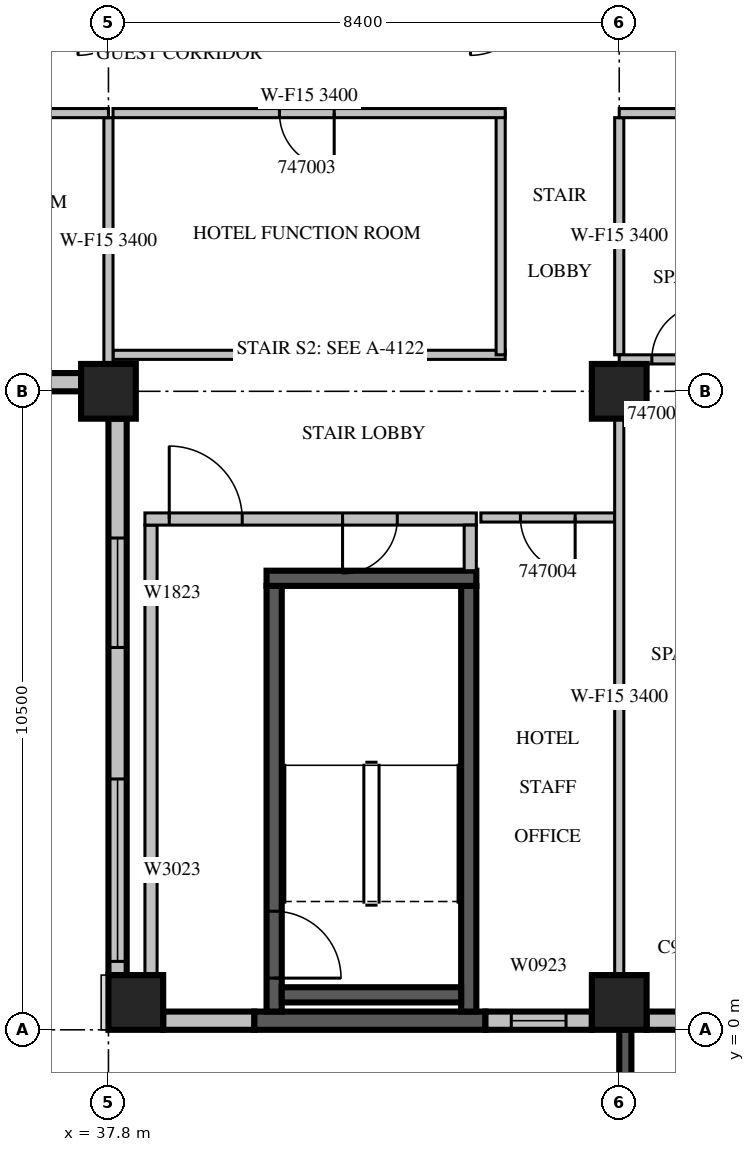
"""IFC4 building model, lengths in metres.
Left out: names, types, materials, properties, quantities, classifications, styles, units other than length and angle.
Written with IfcOpenShell. Run it as: python <this file> out.ifc"""

import sys

from ifc_helpers import new_model, si_unit, direction, frame, frame_2d, origin, origin_2d, place, context, subcontext, project, spatial, rectangle, extrude, source, transform, mapped, element, fill, save


model = new_model("IFC4")
c1 = context("Model", 3, precision=1e-05, world=origin(), true_north=direction((0.0, 1.0)))
c2 = subcontext(c1, "Body", "Model", "MODEL_VIEW")
j1 = project(units=[si_unit("LENGTHUNIT", "METRE"), si_unit("PLANEANGLEUNIT", "RADIAN")], contexts=[c1])
p1 = place(None, origin())
s1 = spatial("IfcSite", under=j1, at=p1, CompositionType="ELEMENT")
p2 = place(p1, origin())
s2 = spatial("IfcBuilding", under=s1, at=p2, CompositionType="ELEMENT")
p3 = place(p2, frame((0.0, 0.0, 212.0)))
s3 = spatial("IfcBuildingStorey", under=s2, at=p3, CompositionType="ELEMENT", Elevation=212.0)
m1 = source(origin(), c2, "Body", "SweptSolid", [
    extrude(rectangle(XDim=0.9, YDim=0.9, at=origin_2d()), origin(), (0.0, 0.0, 1.0), 3.8),
])
for number, where, z_axis, x_axis in (
    (1, (38.25, 0.45, 0.0), (0.0, 0.0, 1.0), (1.0, 0.0, 0.0)),
    (2, (46.2, 0.45, 0.0), (0.0, 0.0, 1.0), (1.0, 0.0, 0.0)),
    (3, (37.8, 10.5, 0.0), (0.0, 0.0, 1.0), (1.0, 0.0, 0.0)),
    (4, (46.2, 10.5, 0.0), (0.0, 0.0, 1.0), (1.0, 0.0, 0.0)),
):
    element("IfcColumn", number, at=place(p3, frame(where, z_axis=z_axis, x_axis=x_axis)), inside=s3, PredefinedType="COLUMN", context=c2, shape_type="MappedRepresentation", body=[
        mapped(m1, transform((0.0, 0.0, 0.0), scale=1.0)),
    ])
m2 = source(origin(), c2, "Body", "SweptSolid", [
    extrude(rectangle(XDim=7.5, YDim=0.3, at=frame_2d((3.75, 0.0))), origin(), (0.0, 0.0, 1.0), 2.4),
])
p4 = place(p3, frame((29.85, 10.65, 0.0), z_axis=(0.0, 0.0, 1.0), x_axis=(1.0, 0.0, 0.0)))
e5 = element("IfcWall", 5, at=p4, inside=s3, PredefinedType="STANDARD", context=c2, shape_type="MappedRepresentation", body=[
    mapped(m2, transform((0.0, 0.0, 0.0), scale=1.0)),
])
m3 = source(origin(), c2, "Body", "SweptSolid", [
    extrude(rectangle(XDim=9.15, YDim=0.3, at=frame_2d((4.575, 0.0))), origin(), (0.0, 0.0, 1.0), 3.4),
])
p5 = place(p3, frame((37.95, 10.05, 0.0), z_axis=(0.0, 0.0, 1.0), x_axis=(0.0, -1.0, 0.0)))
e6 = element("IfcWall", 6, at=p5, inside=s3, PredefinedType="STANDARD", context=c2, shape_type="MappedRepresentation", body=[
    mapped(m3, transform((0.0, 0.0, 0.0), scale=1.0)),
])
m4 = source(origin(), c2, "Body", "SweptSolid", [
    extrude(rectangle(XDim=1.8, YDim=2.3, at=frame_2d((0.9, 1.15))), frame((0.0, 0.16, 0.0), z_axis=(0.0, -1.0, 0.0), x_axis=(1.0, 0.0, 0.0)), (0.0, 0.0, 1.0), 0.32),
])
p6 = place(p5, frame((1.962, 0.0, 0.6)))
e7 = element("IfcOpeningElement", 7, at=p6, cuts=e6, PredefinedType="OPENING", context=c2, shape_type="MappedRepresentation", body=[
    mapped(m4, transform((0.0, 0.0, 0.0), scale=1.0)),
])
m5 = source(origin(), c2, "Body", "SweptSolid", [
    extrude(rectangle(XDim=3.0, YDim=2.3, at=frame_2d((1.5, 1.15))), frame((0.0, 0.16, 0.0), z_axis=(0.0, -1.0, 0.0), x_axis=(1.0, 0.0, 0.0)), (0.0, 0.0, 1.0), 0.32),
])
p7 = place(p5, frame((5.925, 0.0, 0.6)))
e8 = element("IfcOpeningElement", 8, at=p7, cuts=e6, PredefinedType="OPENING", context=c2, shape_type="MappedRepresentation", body=[
    mapped(m5, transform((0.0, 0.0, 0.0), scale=1.0)),
])
m6 = source(origin(), c2, "Body", "SweptSolid", [
    extrude(rectangle(XDim=1.5, YDim=0.3, at=frame_2d((0.75, 0.0))), origin(), (0.0, 0.0, 1.0), 3.4),
])
p8 = place(p3, frame((38.7, 0.15, 0.0), z_axis=(0.0, 0.0, 1.0), x_axis=(1.0, 0.0, 0.0)))
e9 = element("IfcWall", 9, at=p8, inside=s3, PredefinedType="STANDARD", context=c2, shape_type="MappedRepresentation", body=[
    mapped(m6, transform((0.0, 0.0, 0.0), scale=1.0)),
])
m7 = source(origin(), c2, "Body", "SweptSolid", [
    extrude(rectangle(XDim=3.8, YDim=0.3, at=frame_2d((1.9, 0.0))), origin(), (0.0, 0.0, 1.0), 3.4),
])
p9 = place(p3, frame((40.2, 0.15, 0.0), z_axis=(0.0, 0.0, 1.0), x_axis=(1.0, 0.0, 0.0)))
e10 = element("IfcWall", 10, at=p9, inside=s3, PredefinedType="SOLIDWALL", context=c2, shape_type="MappedRepresentation", body=[
    mapped(m7, transform((0.0, 0.0, 0.0), scale=1.0)),
])
m8 = source(origin(), c2, "Body", "SweptSolid", [
    extrude(rectangle(XDim=1.75, YDim=0.3, at=frame_2d((0.875, 0.0))), origin(), (0.0, 0.0, 1.0), 3.4),
])
p10 = place(p3, frame((44.0, 0.15, 0.0), z_axis=(0.0, 0.0, 1.0), x_axis=(1.0, 0.0, 0.0)))
e11 = element("IfcWall", 11, at=p10, inside=s3, PredefinedType="STANDARD", context=c2, shape_type="MappedRepresentation", body=[
    mapped(m8, transform((0.0, 0.0, 0.0), scale=1.0)),
])
m9 = source(origin(), c2, "Body", "SweptSolid", [
    extrude(rectangle(XDim=0.9, YDim=2.3, at=frame_2d((0.45, 1.15))), frame((0.0, 0.16, 0.0), z_axis=(0.0, -1.0, 0.0), x_axis=(1.0, 0.0, 0.0)), (0.0, 0.0, 1.0), 0.32),
])
p11 = place(p10, frame((0.425, 0.0, 0.6)))
e12 = element("IfcOpeningElement", 12, at=p11, cuts=e11, PredefinedType="OPENING", context=c2, shape_type="MappedRepresentation", body=[
    mapped(m9, transform((0.0, 0.0, 0.0), scale=1.0)),
])
m10 = source(origin(), c2, "Body", "SweptSolid", [
    extrude(rectangle(XDim=4.98, YDim=0.3, at=frame_2d((2.49, 0.0))), origin(), (0.0, 0.0, 1.0), 3.4),
])
p12 = place(p3, frame((46.65, 0.15, 0.0), z_axis=(0.0, 0.0, 1.0), x_axis=(1.0, 0.0, 0.0)))
e13 = element("IfcWall", 13, at=p12, inside=s3, PredefinedType="STANDARD", context=c2, shape_type="MappedRepresentation", body=[
    mapped(m10, transform((0.0, 0.0, 0.0), scale=1.0)),
])
m11 = source(origin(), c2, "Body", "SweptSolid", [
    extrude(rectangle(XDim=1.0, YDim=2.1, at=frame_2d((0.5, 1.05))), frame((0.0, 0.16, 0.0), z_axis=(0.0, -1.0, 0.0), x_axis=(1.0, 0.0, 0.0)), (0.0, 0.0, 1.0), 0.32),
])
p13 = place(p12, frame((1.99, 0.0, 0.0)))
e14 = element("IfcOpeningElement", 14, at=p13, cuts=e13, PredefinedType="OPENING", context=c2, shape_type="MappedRepresentation", body=[
    mapped(m11, transform((0.0, 0.0, 0.0), scale=1.0)),
])
m12 = source(origin(), c2, "Body", "SweptSolid", [
    extrude(rectangle(XDim=3.9, YDim=0.2, at=frame_2d((1.95, 0.0))), origin(), (0.0, 0.0, 1.0), 3.39),
])
p14 = place(p3, frame((46.3, 0.0, 0.0), z_axis=(0.0, 0.0, 1.0), x_axis=(0.0, -1.0, 0.0)))
e15 = element("IfcWall", 15, at=p14, inside=s3, PredefinedType="SOLIDWALL", context=c2, shape_type="MappedRepresentation", body=[
    mapped(m12, transform((0.0, 0.0, 0.0), scale=1.0)),
])
m13 = source(origin(), c2, "Body", "SweptSolid", [
    extrude(rectangle(XDim=2.4, YDim=2.3, at=frame_2d((1.2, 1.15))), frame((0.0, 0.11, 0.0), z_axis=(0.0, -1.0, 0.0), x_axis=(1.0, 0.0, 0.0)), (0.0, 0.0, 1.0), 0.22),
])
p15 = place(p14, frame((0.75, 0.0, 0.6)))
e16 = element("IfcOpeningElement", 16, at=p15, cuts=e15, PredefinedType="OPENING", context=c2, shape_type="MappedRepresentation", body=[
    mapped(m13, transform((0.0, 0.0, 0.0), scale=1.0)),
])
m14 = source(origin(), c2, "Body", "SweptSolid", [
    extrude(rectangle(XDim=7.0, YDim=0.25, at=frame_2d((3.5, 0.0))), origin(), (0.0, 0.0, 1.0), 3.4),
])
p16 = place(p3, frame((40.525, 0.3, 0.0), z_axis=(0.0, 0.0, 1.0), x_axis=(0.0, 1.0, 0.0)))
e17 = element("IfcWall", 17, at=p16, inside=s3, PredefinedType="SOLIDWALL", context=c2, shape_type="MappedRepresentation", body=[
    mapped(m14, transform((0.0, 0.0, 0.0), scale=1.0)),
])
m15 = source(origin(), c2, "Body", "SweptSolid", [
    extrude(rectangle(XDim=1.1, YDim=2.1, at=frame_2d((0.55, 1.05))), frame((0.0, 0.135, 0.0), z_axis=(0.0, -1.0, 0.0), x_axis=(1.0, 0.0, 0.0)), (0.0, 0.0, 1.0), 0.27),
])
p17 = place(p16, frame((0.55, 0.0, 0.0)))
e18 = element("IfcOpeningElement", 18, at=p17, cuts=e17, PredefinedType="OPENING", context=c2, shape_type="MappedRepresentation", body=[
    mapped(m15, transform((0.0, 0.0, 0.0), scale=1.0)),
])
p18 = place(p3, frame((43.725, 0.3, 0.0), z_axis=(0.0, 0.0, 1.0), x_axis=(0.0, 1.0, 0.0)))
e19 = element("IfcWall", 19, at=p18, inside=s3, PredefinedType="SOLIDWALL", context=c2, shape_type="MappedRepresentation", body=[
    mapped(m14, transform((0.0, 0.0, 0.0), scale=1.0)),
])
m16 = source(origin(), c2, "Body", "SweptSolid", [
    extrude(rectangle(XDim=3.45, YDim=0.25, at=frame_2d((1.725, 0.0))), origin(), (0.0, 0.0, 1.0), 3.4),
])
p19 = place(p3, frame((40.4, 7.425, 0.0), z_axis=(0.0, 0.0, 1.0), x_axis=(1.0, 0.0, 0.0)))
e20 = element("IfcWall", 20, at=p19, inside=s3, PredefinedType="SOLIDWALL", context=c2, shape_type="MappedRepresentation", body=[
    mapped(m16, transform((0.0, 0.0, 0.0), scale=1.0)),
])
m17 = source(origin(), c2, "Body", "SweptSolid", [
    extrude(rectangle(XDim=2.95, YDim=0.25, at=frame_2d((1.475, 0.0))), origin(), (0.0, 0.0, 1.0), 3.4),
])
p20 = place(p3, frame((40.65, 0.575, 0.0), z_axis=(0.0, 0.0, 1.0), x_axis=(1.0, 0.0, 0.0)))
e21 = element("IfcWall", 21, at=p20, inside=s3, PredefinedType="SOLIDWALL", context=c2, shape_type="MappedRepresentation", body=[
    mapped(m17, transform((0.0, 0.0, 0.0), scale=1.0)),
])
m18 = source(origin(), c2, "Body", "SweptSolid", [
    extrude(rectangle(XDim=8.0, YDim=0.2, at=frame_2d((4.0, 0.0))), origin(), (0.0, 0.0, 1.0), 3.4),
])
p21 = place(p3, frame((38.5, 0.3, 0.0), z_axis=(0.0, 0.0, 1.0), x_axis=(0.0, 1.0, 0.0)))
e22 = element("IfcWall", 22, at=p21, inside=s3, PredefinedType="PARTITIONING", context=c2, shape_type="MappedRepresentation", body=[
    mapped(m18, transform((0.0, 0.0, 0.0), scale=1.0)),
])
m19 = source(origin(), c2, "Body", "SweptSolid", [
    extrude(rectangle(XDim=5.45, YDim=0.2, at=frame_2d((2.725, 0.0))), origin(), (0.0, 0.0, 1.0), 3.4),
])
p22 = place(p3, frame((38.4, 8.4, 0.0), z_axis=(0.0, 0.0, 1.0), x_axis=(1.0, 0.0, 0.0)))
e23 = element("IfcWall", 23, at=p22, inside=s3, PredefinedType="PARTITIONING", context=c2, shape_type="MappedRepresentation", body=[
    mapped(m19, transform((0.0, 0.0, 0.0), scale=1.0)),
])
m20 = source(origin(), c2, "Body", "SweptSolid", [
    extrude(rectangle(XDim=1.2, YDim=2.1, at=frame_2d((0.6, 1.05))), frame((0.0, 0.11, 0.0), z_axis=(0.0, -1.0, 0.0), x_axis=(1.0, 0.0, 0.0)), (0.0, 0.0, 1.0), 0.22),
])
p23 = place(p22, frame((0.4, 0.0, 0.0)))
e24 = element("IfcOpeningElement", 24, at=p23, cuts=e23, PredefinedType="OPENING", context=c2, shape_type="MappedRepresentation", body=[
    mapped(m20, transform((0.0, 0.0, 0.0), scale=1.0)),
])
m21 = source(origin(), c2, "Body", "SweptSolid", [
    extrude(rectangle(XDim=0.9, YDim=2.1, at=frame_2d((0.45, 1.05))), frame((0.0, 0.11, 0.0), z_axis=(0.0, -1.0, 0.0), x_axis=(1.0, 0.0, 0.0)), (0.0, 0.0, 1.0), 0.22),
])
p24 = place(p22, frame((3.25, 0.0, 0.0)))
e25 = element("IfcOpeningElement", 25, at=p24, cuts=e23, PredefinedType="OPENING", context=c2, shape_type="MappedRepresentation", body=[
    mapped(m21, transform((0.0, 0.0, 0.0), scale=1.0)),
])
m22 = source(origin(), c2, "Body", "SweptSolid", [
    extrude(rectangle(XDim=0.75, YDim=0.2, at=frame_2d((0.375, 0.0))), origin(), (0.0, 0.0, 1.0), 3.4),
])
p25 = place(p3, frame((43.75, 7.55, 0.0), z_axis=(0.0, 0.0, 1.0), x_axis=(0.0, 1.0, 0.0)))
e26 = element("IfcWall", 26, at=p25, inside=s3, PredefinedType="PARTITIONING", context=c2, shape_type="MappedRepresentation", body=[
    mapped(m22, transform((0.0, 0.0, 0.0), scale=1.0)),
])
m23 = source(origin(), c2, "Body", "SweptSolid", [
    extrude(rectangle(XDim=6.45, YDim=0.15, at=frame_2d((3.225, 0.0))), origin(), (0.0, 0.0, 1.0), 3.4),
])
p26 = place(p3, frame((37.875, 11.1, 0.0), z_axis=(0.0, 0.0, 1.0), x_axis=(1.0, 0.0, 0.0)))
e27 = element("IfcWall", 27, at=p26, inside=s3, PredefinedType="PARTITIONING", context=c2, shape_type="MappedRepresentation", body=[
    mapped(m23, transform((0.0, 0.0, 0.0), scale=1.0)),
])
m24 = source(origin(), c2, "Body", "SweptSolid", [
    extrude(rectangle(XDim=3.975, YDim=0.15, at=frame_2d((1.988, 0.0))), origin(), (0.0, 0.0, 1.0), 3.4),
])
p27 = place(p3, frame((44.25, 11.1, 0.0), z_axis=(0.0, 0.0, 1.0), x_axis=(0.0, 1.0, 0.0)))
e28 = element("IfcWall", 28, at=p27, inside=s3, PredefinedType="PARTITIONING", context=c2, shape_type="MappedRepresentation", body=[
    mapped(m24, transform((0.0, 0.0, 0.0), scale=1.0)),
])
p28 = place(p3, frame((44.325, 15.075, 0.0), z_axis=(0.0, 0.0, 1.0), x_axis=(-1.0, 0.0, 0.0)))
e29 = element("IfcWall", 29, at=p28, inside=s3, PredefinedType="PARTITIONING", context=c2, shape_type="MappedRepresentation", body=[
    mapped(m23, transform((0.0, 0.0, 0.0), scale=1.0)),
])
m25 = source(origin(), c2, "Body", "SweptSolid", [
    extrude(rectangle(XDim=0.9, YDim=2.1, at=frame_2d((0.45, 1.05))), frame((0.0, 0.085, 0.0), z_axis=(0.0, -1.0, 0.0), x_axis=(1.0, 0.0, 0.0)), (0.0, 0.0, 1.0), 0.17),
])
p29 = place(p28, frame((2.812, 0.0, 0.0)))
e30 = element("IfcOpeningElement", 30, at=p29, cuts=e29, PredefinedType="OPENING", context=c2, shape_type="MappedRepresentation", body=[
    mapped(m25, transform((0.0, 0.0, 0.0), scale=1.0)),
])
m26 = source(origin(), c2, "Body", "SweptSolid", [
    extrude(rectangle(XDim=2.2, YDim=0.15, at=frame_2d((1.1, 0.0))), origin(), (0.0, 0.0, 1.0), 3.4),
])
p30 = place(p3, frame((46.125, 8.425, 0.0), z_axis=(0.0, 0.0, 1.0), x_axis=(-1.0, 0.0, 0.0)))
e31 = element("IfcWall", 31, at=p30, inside=s3, PredefinedType="PARTITIONING", context=c2, shape_type="MappedRepresentation", body=[
    mapped(m26, transform((0.0, 0.0, 0.0), scale=1.0)),
])
p31 = place(p30, frame((0.65, 0.0, 0.0)))
e32 = element("IfcOpeningElement", 32, at=p31, cuts=e31, PredefinedType="OPENING", context=c2, shape_type="MappedRepresentation", body=[
    mapped(m25, transform((0.0, 0.0, 0.0), scale=1.0)),
])
m27 = source(origin(), c2, "Body", "SweptSolid", [
    extrude(rectangle(XDim=4.051, YDim=0.15, at=frame_2d((2.026, 0.0))), origin(), (0.0, 0.0, 1.0), 3.4),
])
p32 = place(p3, frame((37.8, 10.949, 0.0), z_axis=(0.0, 0.0, 1.0), x_axis=(0.0, 1.0, 0.0)))
e33 = element("IfcWall", 33, at=p32, inside=s3, PredefinedType="PARTITIONING", context=c2, shape_type="MappedRepresentation", body=[
    mapped(m27, transform((0.0, 0.0, 0.0), scale=1.0)),
])
m28 = source(origin(), c2, "Body", "SweptSolid", [
    extrude(rectangle(XDim=9.152, YDim=0.15, at=frame_2d((4.576, 0.0))), origin(), (0.0, 0.0, 1.0), 3.4),
])
p33 = place(p3, frame((46.2, 0.899, 0.0), z_axis=(0.0, 0.0, 1.0), x_axis=(0.0, 1.0, 0.0)))
e34 = element("IfcWall", 34, at=p33, inside=s3, PredefinedType="PARTITIONING", context=c2, shape_type="MappedRepresentation", body=[
    mapped(m28, transform((0.0, 0.0, 0.0), scale=1.0)),
])
m29 = source(origin(), c2, "Body", "SweptSolid", [
    extrude(rectangle(XDim=3.9, YDim=0.15, at=frame_2d((1.95, 0.0))), origin(), (0.0, 0.0, 1.0), 3.4),
])
p34 = place(p3, frame((46.2, 11.1, 0.0), z_axis=(0.0, 0.0, 1.0), x_axis=(0.0, 1.0, 0.0)))
e35 = element("IfcWall", 35, at=p34, inside=s3, PredefinedType="PARTITIONING", context=c2, shape_type="MappedRepresentation", body=[
    mapped(m29, transform((0.0, 0.0, 0.0), scale=1.0)),
])
m30 = source(origin(), c2, "Body", "SweptSolid", [
    extrude(rectangle(XDim=7.355, YDim=0.15, at=frame_2d((3.678, 0.0))), origin(), (0.0, 0.0, 1.0), 3.4),
])
p35 = place(p3, frame((53.555, 11.025, 0.0), z_axis=(0.0, 0.0, 1.0), x_axis=(-1.0, 0.0, 0.0)))
e36 = element("IfcWall", 36, at=p35, inside=s3, PredefinedType="PARTITIONING", context=c2, shape_type="MappedRepresentation", body=[
    mapped(m30, transform((0.0, 0.0, 0.0), scale=1.0)),
])
m31 = source(origin(), c2, "Body", "SweptSolid", [
    extrude(rectangle(XDim=1.0, YDim=2.1, at=frame_2d((0.5, 1.05))), frame((0.0, 0.085, 0.0), z_axis=(0.0, -1.0, 0.0), x_axis=(1.0, 0.0, 0.0)), (0.0, 0.0, 1.0), 0.17),
])
p36 = place(p35, frame((4.869, 0.0, 0.0)))
e37 = element("IfcOpeningElement", 37, at=p36, cuts=e36, PredefinedType="OPENING", context=c2, shape_type="MappedRepresentation", body=[
    mapped(m31, transform((0.0, 0.0, 0.0), scale=1.0)),
])
p37 = place(p35, frame((5.919, 0.0, 0.0)))
e38 = element("IfcOpeningElement", 38, at=p37, cuts=e36, PredefinedType="OPENING", context=c2, shape_type="MappedRepresentation", body=[
    mapped(m25, transform((0.0, 0.0, 0.0), scale=1.0)),
])
m32 = source(origin(), c2, "Body", "SweptSolid", [
    extrude(rectangle(XDim=8.4, YDim=0.15, at=frame_2d((4.2, 0.0))), origin(), (0.0, 0.0, 1.0), 2.9),
])
p38 = place(p3, frame((37.8, 15.075, 0.0), z_axis=(0.0, 0.0, 1.0), x_axis=(-1.0, 0.0, 0.0)))
e39 = element("IfcWall", 39, at=p38, inside=s3, PredefinedType="PARTITIONING", context=c2, shape_type="MappedRepresentation", body=[
    mapped(m32, transform((0.0, 0.0, 0.0), scale=1.0)),
])
p39 = place(p38, frame((7.155, 0.0, 0.0)))
e40 = element("IfcOpeningElement", 40, at=p39, cuts=e39, PredefinedType="OPENING", context=c2, shape_type="MappedRepresentation", body=[
    mapped(m31, transform((0.0, 0.0, 0.0), scale=1.0)),
])
p40 = place(p38, frame((1.767, 0.0, 0.0)))
e41 = element("IfcOpeningElement", 41, at=p40, cuts=e39, PredefinedType="OPENING", context=c2, shape_type="MappedRepresentation", body=[
    mapped(m25, transform((0.0, 0.0, 0.0), scale=1.0)),
])
p41 = place(p3, frame((53.555, 15.075, 0.0), z_axis=(0.0, 0.0, 1.0), x_axis=(-1.0, 0.0, 0.0)))
e42 = element("IfcWall", 42, at=p41, inside=s3, PredefinedType="PARTITIONING", context=c2, shape_type="MappedRepresentation", body=[
    mapped(m30, transform((0.0, 0.0, 0.0), scale=1.0)),
])
m33 = source(origin(), c2, "Body", "SweptSolid", [
    extrude(rectangle(XDim=1.2, YDim=2.1, at=frame_2d((0.6, 1.05))), frame((0.0, 0.085, 0.0), z_axis=(0.0, -1.0, 0.0), x_axis=(1.0, 0.0, 0.0)), (0.0, 0.0, 1.0), 0.17),
])
p42 = place(p41, frame((5.006, 0.0, 0.0)))
e43 = element("IfcOpeningElement", 43, at=p42, cuts=e42, PredefinedType="OPENING", context=c2, shape_type="MappedRepresentation", body=[
    mapped(m33, transform((0.0, 0.0, 0.0), scale=1.0)),
])
p43 = place(p41, frame((2.124, 0.0, 0.0)))
e44 = element("IfcOpeningElement", 44, at=p43, cuts=e42, PredefinedType="OPENING", context=c2, shape_type="MappedRepresentation", body=[
    mapped(m25, transform((0.0, 0.0, 0.0), scale=1.0)),
])
m34 = source(origin(), c2, "Body", "SweptSolid", [
    extrude(rectangle(XDim=1.8, YDim=2.3, at=frame_2d((0.9, 1.15))), frame((0.0, 0.03, 0.0), z_axis=(0.0, -1.0, 0.0), x_axis=(1.0, 0.0, 0.0)), (0.0, 0.0, 1.0), 0.06),
])
p44 = place(p6, origin())
e45 = element("IfcWindow", 45, at=p44, inside=s3, PartitioningType="SINGLE_PANEL", PredefinedType="WINDOW", context=c2, shape_type="MappedRepresentation", body=[
    mapped(m34, transform((0.0, 0.0, 0.0), scale=1.0)),
])
fill(e7, e45)
m35 = source(origin(), c2, "Body", "SweptSolid", [
    extrude(rectangle(XDim=3.0, YDim=2.3, at=frame_2d((1.5, 1.15))), frame((0.0, 0.03, 0.0), z_axis=(0.0, -1.0, 0.0), x_axis=(1.0, 0.0, 0.0)), (0.0, 0.0, 1.0), 0.06),
])
p45 = place(p7, origin())
e46 = element("IfcWindow", 46, at=p45, inside=s3, PartitioningType="SINGLE_PANEL", PredefinedType="WINDOW", context=c2, shape_type="MappedRepresentation", body=[
    mapped(m35, transform((0.0, 0.0, 0.0), scale=1.0)),
])
fill(e8, e46)
m36 = source(origin(), c2, "Body", "SweptSolid", [
    extrude(rectangle(XDim=0.9, YDim=2.3, at=frame_2d((0.45, 1.15))), frame((0.0, 0.03, 0.0), z_axis=(0.0, -1.0, 0.0), x_axis=(1.0, 0.0, 0.0)), (0.0, 0.0, 1.0), 0.06),
])
p46 = place(p11, origin())
e47 = element("IfcWindow", 47, at=p46, inside=s3, PartitioningType="SINGLE_PANEL", PredefinedType="WINDOW", context=c2, shape_type="MappedRepresentation", body=[
    mapped(m36, transform((0.0, 0.0, 0.0), scale=1.0)),
])
fill(e12, e47)
m37 = source(origin(), c2, "Body", "SweptSolid", [
    extrude(rectangle(XDim=1.1, YDim=2.1, at=frame_2d((0.55, 1.05))), frame((0.0, 0.025, 0.0), z_axis=(0.0, -1.0, 0.0), x_axis=(1.0, 0.0, 0.0)), (0.0, 0.0, 1.0), 0.05),
])
p47 = place(p17, origin())
e48 = element("IfcDoor", 48, at=p47, inside=s3, OperationType="SINGLE_SWING_RIGHT", PredefinedType="DOOR", context=c2, shape_type="MappedRepresentation", body=[
    mapped(m37, transform((0.0, 0.0, 0.0), scale=1.0)),
])
fill(e18, e48)
m38 = source(origin(), c2, "Body", "SweptSolid", [
    extrude(rectangle(XDim=1.2, YDim=2.1, at=frame_2d((0.6, 1.05))), frame((0.0, 0.025, 0.0), z_axis=(0.0, -1.0, 0.0), x_axis=(1.0, 0.0, 0.0)), (0.0, 0.0, 1.0), 0.05),
])
p48 = place(p23, origin())
e49 = element("IfcDoor", 49, at=p48, inside=s3, OperationType="SINGLE_SWING_LEFT", PredefinedType="DOOR", context=c2, shape_type="MappedRepresentation", body=[
    mapped(m38, transform((0.0, 0.0, 0.0), scale=1.0)),
])
fill(e24, e49)
m39 = source(origin(), c2, "Body", "SweptSolid", [
    extrude(rectangle(XDim=0.9, YDim=2.1, at=frame_2d((0.45, 1.05))), frame((0.0, 0.025, 0.0), z_axis=(0.0, -1.0, 0.0), x_axis=(1.0, 0.0, 0.0)), (0.0, 0.0, 1.0), 0.05),
])
p49 = place(p24, origin())
e50 = element("IfcDoor", 50, at=p49, inside=s3, OperationType="SINGLE_SWING_RIGHT", PredefinedType="DOOR", context=c2, shape_type="MappedRepresentation", body=[
    mapped(m39, transform((0.0, 0.0, 0.0), scale=1.0)),
])
fill(e25, e50)
p50 = place(p29, origin())
e51 = element("IfcDoor", 51, at=p50, inside=s3, OperationType="SINGLE_SWING_LEFT", PredefinedType="DOOR", context=c2, shape_type="MappedRepresentation", body=[
    mapped(m39, transform((0.0, 0.0, 0.0), scale=1.0)),
])
fill(e30, e51)
p51 = place(p31, origin())
e52 = element("IfcDoor", 52, at=p51, inside=s3, OperationType="SINGLE_SWING_LEFT", PredefinedType="DOOR", context=c2, shape_type="MappedRepresentation", body=[
    mapped(m39, transform((0.0, 0.0, 0.0), scale=1.0)),
])
fill(e32, e52)
p52 = place(p37, origin())
e53 = element("IfcDoor", 53, at=p52, inside=s3, OperationType="SINGLE_SWING_RIGHT", PredefinedType="DOOR", context=c2, shape_type="MappedRepresentation", body=[
    mapped(m39, transform((0.0, 0.0, 0.0), scale=1.0)),
])
fill(e38, e53)
save(model, sys.argv[1])
